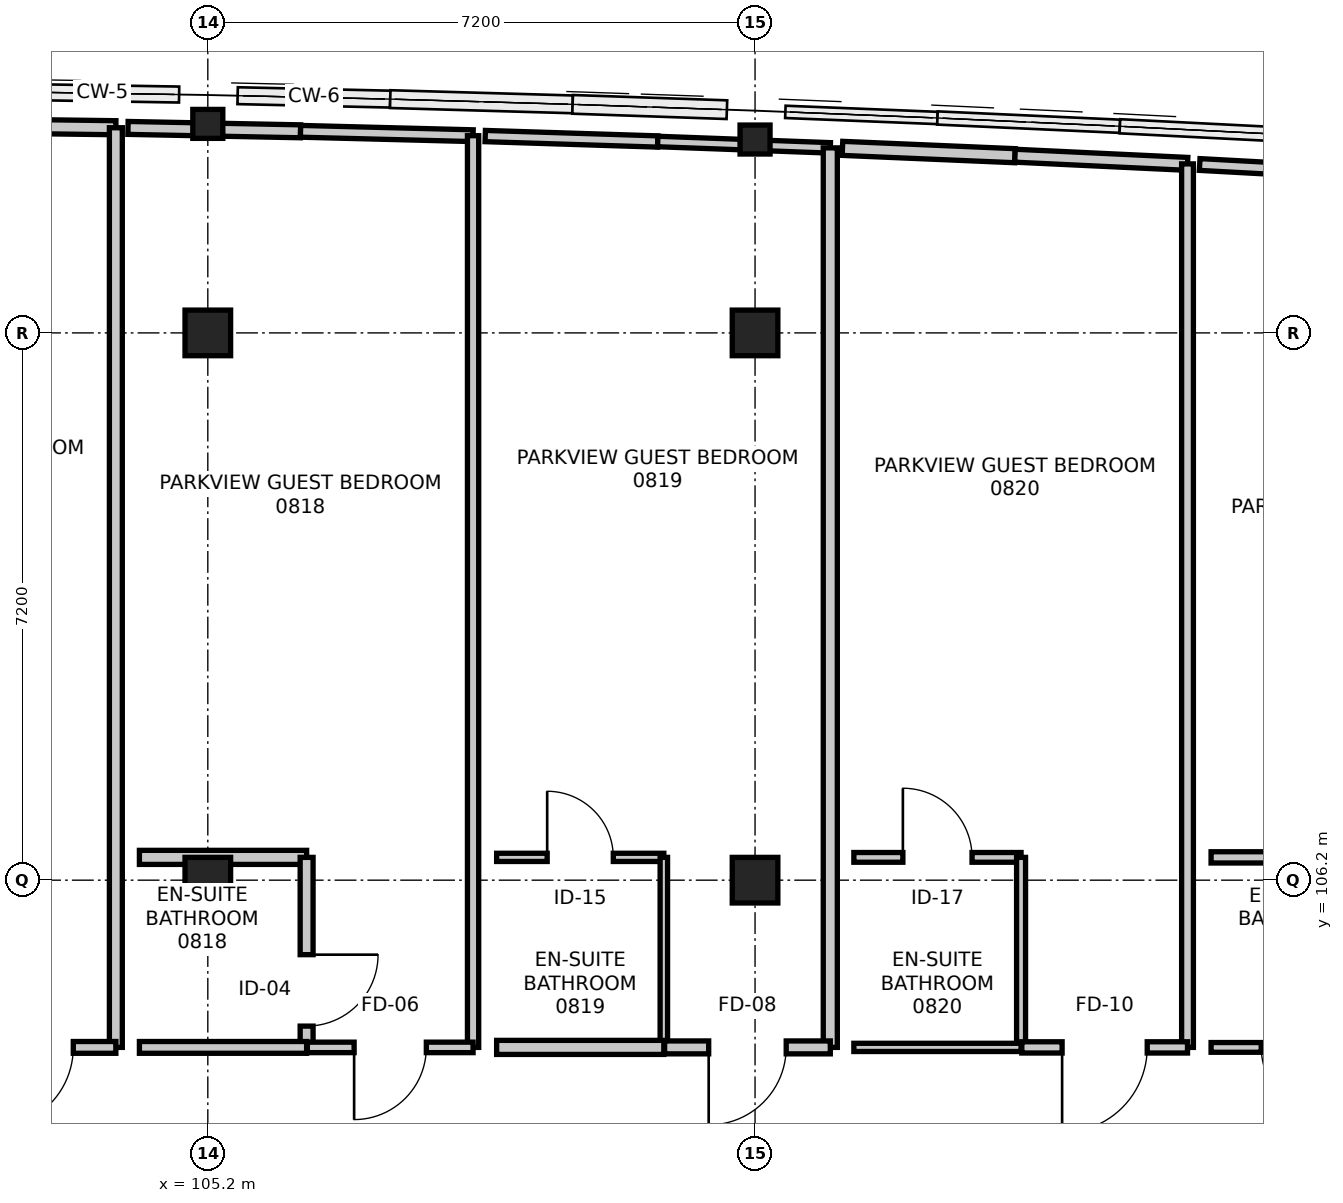
"""IFC4 building model, lengths in metres.
Left out: names, types, materials, properties, quantities, classifications, styles, units other than length and angle.
Written with IfcOpenShell. Run it as: python <this file> out.ifc"""

import sys

from ifc_helpers import new_model, si_unit, direction, frame, frame_2d, origin, origin_2d, place, context, subcontext, project, spatial, rectangle, i_section, extrude, element, fill, save


model = new_model("IFC4")
c1 = context("Model", 3, precision=1e-05, world=origin(), true_north=direction((0.0, 1.0)))
c2 = subcontext(c1, "Body", "Model", "MODEL_VIEW")
j1 = project(units=[si_unit("LENGTHUNIT", "METRE"), si_unit("PLANEANGLEUNIT", "RADIAN")], contexts=[c1])
p1 = place(None, origin())
s1 = spatial("IfcSite", under=j1, at=p1, CompositionType="ELEMENT")
p2 = place(p1, origin())
s2 = spatial("IfcBuilding", under=s1, at=p2, CompositionType="ELEMENT")
p3 = place(p2, frame((0.0, 0.0, 33.6)))
s3 = spatial("IfcBuildingStorey", under=s2, at=p3, CompositionType="ELEMENT", Elevation=33.6)
for number, where, z_axis, x_axis in (
    (1, (105.2, 106.2, 0.0), (0.0, 0.0, 1.0), (1.0, 0.0, 0.0)),
    (2, (105.2, 113.4, 0.0), (0.0, 0.0, 1.0), (1.0, 0.0, 0.0)),
):
    element("IfcColumn", number, at=place(p3, frame(where, z_axis=z_axis, x_axis=x_axis)), inside=s3, PredefinedType="COLUMN", context=c2, shape_type="SweptSolid", body=[
        extrude(rectangle(XDim=0.6, YDim=0.6, at=origin_2d()), origin(), (0.0, 0.0, 1.0), 3.6),
    ])
p4 = place(p3, frame((105.2, 116.15, 0.0), z_axis=(0.0, 0.0, 1.0), x_axis=(1.0, 0.0, 0.0)))
e3 = element("IfcColumn", 3, at=p4, inside=s3, PredefinedType="COLUMN", context=c2, shape_type="SweptSolid", body=[
    extrude(i_section(OverallWidth=0.395, OverallDepth=0.381, WebThickness=0.018, FlangeThickness=0.03, FilletRadius=0.015, at=origin_2d()), origin(), (0.0, 0.0, 1.0), 3.6),
])
for number, where, z_axis, x_axis in (
    (4, (112.4, 106.2, 0.0), (0.0, 0.0, 1.0), (1.0, 0.0, 0.0)),
    (5, (112.4, 113.4, 0.0), (0.0, 0.0, 1.0), (1.0, 0.0, 0.0)),
):
    element("IfcColumn", number, at=place(p3, frame(where, z_axis=z_axis, x_axis=x_axis)), inside=s3, PredefinedType="COLUMN", context=c2, shape_type="SweptSolid", body=[
        extrude(rectangle(XDim=0.6, YDim=0.6, at=origin_2d()), origin(), (0.0, 0.0, 1.0), 3.6),
    ])
p5 = place(p3, frame((112.4, 115.944, 0.0), z_axis=(0.0, 0.0, 1.0), x_axis=(1.0, 0.0, 0.0)))
e6 = element("IfcColumn", 6, at=p5, inside=s3, PredefinedType="COLUMN", context=c2, shape_type="SweptSolid", body=[
    extrude(i_section(OverallWidth=0.395, OverallDepth=0.381, WebThickness=0.018, FlangeThickness=0.03, FilletRadius=0.015, at=origin_2d()), origin(), (0.0, 0.0, 1.0), 3.6),
])
p6 = place(p3, frame((101.72, 116.129, 0.0), z_axis=(0.0, 0.0, 1.0), x_axis=(0.999913929464, -0.013119971972, 0.0)))
e7 = element("IfcWall", 7, at=p6, inside=s3, PredefinedType="PARTITIONING", context=c2, shape_type="SweptSolid", body=[
    extrude(rectangle(XDim=2.27, YDim=0.185, at=frame_2d((1.135, 0.0))), origin(), (0.0, 0.0, 1.0), 2.936),
])
p7 = place(p3, frame((103.99, 116.099, 0.0), z_axis=(0.0, 0.0, 1.0), x_axis=(0.0, -1.0, 0.0)))
e8 = element("IfcWall", 8, at=p7, inside=s3, PredefinedType="PARTITIONING", context=c2, shape_type="SweptSolid", body=[
    extrude(rectangle(XDim=12.099, YDim=0.17, at=frame_2d((6.05, 0.0))), origin(), (0.0, 0.0, 1.0), 2.745),
])
p8 = place(p3, frame((103.99, 104.0, 0.0), z_axis=(0.0, 0.0, 1.0), x_axis=(-1.0, 0.0, 0.0)))
e9 = element("IfcWall", 9, at=p8, inside=s3, PredefinedType="PARTITIONING", context=c2, shape_type="SweptSolid", body=[
    extrude(rectangle(XDim=2.18, YDim=0.155, at=frame_2d((1.09, 0.0))), origin(), (0.0, 0.0, 1.0), 3.36),
])
p9 = place(p8, frame((0.56, 0.0, 0.0)))
e10 = element("IfcOpeningElement", 10, at=p9, cuts=e9, PredefinedType="OPENING", context=c2, shape_type="SweptSolid", body=[
    extrude(rectangle(XDim=1.06, YDim=2.2, at=frame_2d((0.53, 1.1))), frame((0.0, 0.087, 0.0), z_axis=(0.0, -1.0, 0.0), x_axis=(1.0, 0.0, 0.0)), (0.0, 0.0, 1.0), 0.175),
])
p10 = place(p3, frame((104.3, 106.5, 0.0), z_axis=(0.0, 0.0, 1.0), x_axis=(1.0, 0.0, 0.0)))
e11 = element("IfcWall", 11, at=p10, inside=s3, PredefinedType="PARTITIONING", context=c2, shape_type="SweptSolid", body=[
    extrude(rectangle(XDim=2.2, YDim=0.185, at=frame_2d((1.1, 0.0))), origin(), (0.0, 0.0, 1.0), 2.695),
])
p11 = place(p3, frame((106.5, 106.5, 0.0), z_axis=(0.0, 0.0, 1.0), x_axis=(0.0, -1.0, 0.0)))
e12 = element("IfcWall", 12, at=p11, inside=s3, PredefinedType="PARTITIONING", context=c2, shape_type="SweptSolid", body=[
    extrude(rectangle(XDim=2.5, YDim=0.17, at=frame_2d((1.25, 0.0))), origin(), (0.0, 0.0, 1.0), 2.745),
])
p12 = place(p11, frame((1.28, 0.0, 0.0)))
e13 = element("IfcOpeningElement", 13, at=p12, cuts=e12, PredefinedType="OPENING", context=c2, shape_type="SweptSolid", body=[
    extrude(rectangle(XDim=0.94, YDim=2.12, at=frame_2d((0.47, 1.06))), frame((0.0, 0.095, 0.0), z_axis=(0.0, -1.0, 0.0), x_axis=(1.0, 0.0, 0.0)), (0.0, 0.0, 1.0), 0.19),
])
p13 = place(p3, frame((106.5, 104.0, 0.0), z_axis=(0.0, 0.0, 1.0), x_axis=(-1.0, 0.0, 0.0)))
e14 = element("IfcWall", 14, at=p13, inside=s3, PredefinedType="PARTITIONING", context=c2, shape_type="SweptSolid", body=[
    extrude(rectangle(XDim=2.2, YDim=0.155, at=frame_2d((1.1, 0.0))), origin(), (0.0, 0.0, 1.0), 2.695),
])
p14 = place(p3, frame((104.15, 116.097, 0.0), z_axis=(0.0, 0.0, 1.0), x_axis=(0.999808482299, -0.01957035317, 0.0)))
e15 = element("IfcWall", 15, at=p14, inside=s3, PredefinedType="PARTITIONING", context=c2, shape_type="SweptSolid", body=[
    extrude(rectangle(XDim=2.271, YDim=0.17, at=frame_2d((1.135, 0.0))), origin(), (0.0, 0.0, 1.0), 2.936),
])
p15 = place(p3, frame((106.42, 116.052, 0.0), z_axis=(0.0, 0.0, 1.0), x_axis=(0.999675304662, -0.025481076275, 0.0)))
e16 = element("IfcWall", 16, at=p15, inside=s3, PredefinedType="PARTITIONING", context=c2, shape_type="SweptSolid", body=[
    extrude(rectangle(XDim=2.271, YDim=0.155, at=frame_2d((1.135, 0.0))), origin(), (0.0, 0.0, 1.0), 2.936),
])
p16 = place(p3, frame((108.69, 115.994, 0.0), z_axis=(0.0, 0.0, 1.0), x_axis=(0.0, -1.0, 0.0)))
e17 = element("IfcWall", 17, at=p16, inside=s3, PredefinedType="PARTITIONING", context=c2, shape_type="SweptSolid", body=[
    extrude(rectangle(XDim=11.994, YDim=0.148, at=frame_2d((5.997, 0.0))), origin(), (0.0, 0.0, 1.0), 2.745),
])
p17 = place(p3, frame((108.69, 104.0, 0.0), z_axis=(0.0, 0.0, 1.0), x_axis=(-1.0, 0.0, 0.0)))
e18 = element("IfcWall", 18, at=p17, inside=s3, PredefinedType="PARTITIONING", context=c2, shape_type="SweptSolid", body=[
    extrude(rectangle(XDim=2.18, YDim=0.138, at=frame_2d((1.09, 0.0))), origin(), (0.0, 0.0, 1.0), 3.36),
])
p18 = place(p17, frame((0.615, 0.0, 0.0)))
e19 = element("IfcOpeningElement", 19, at=p18, cuts=e18, PredefinedType="OPENING", context=c2, shape_type="SweptSolid", body=[
    extrude(rectangle(XDim=0.95, YDim=2.1, at=frame_2d((0.475, 1.05))), frame((0.0, 0.079, 0.0), z_axis=(0.0, -1.0, 0.0), x_axis=(1.0, 0.0, 0.0)), (0.0, 0.0, 1.0), 0.158),
])
p19 = place(p3, frame((109.0, 106.5, 0.0), z_axis=(0.0, 0.0, 1.0), x_axis=(1.0, 0.0, 0.0)))
e20 = element("IfcWall", 20, at=p19, inside=s3, PredefinedType="PARTITIONING", context=c2, shape_type="SweptSolid", body=[
    extrude(rectangle(XDim=2.2, YDim=0.108, at=frame_2d((1.1, 0.0))), origin(), (0.0, 0.0, 1.0), 3.36),
])
p20 = place(p19, frame((0.665, 0.0, 0.0)))
e21 = element("IfcOpeningElement", 21, at=p20, cuts=e20, PredefinedType="OPENING", context=c2, shape_type="SweptSolid", body=[
    extrude(rectangle(XDim=0.87, YDim=2.07, at=frame_2d((0.435, 1.035))), frame((0.0, 0.064, 0.0), z_axis=(0.0, -1.0, 0.0), x_axis=(1.0, 0.0, 0.0)), (0.0, 0.0, 1.0), 0.128),
])
p21 = place(p3, frame((111.2, 106.5, 0.0), z_axis=(0.0, 0.0, 1.0), x_axis=(0.0, -1.0, 0.0)))
e22 = element("IfcWall", 22, at=p21, inside=s3, PredefinedType="PARTITIONING", context=c2, shape_type="SweptSolid", body=[
    extrude(rectangle(XDim=2.5, YDim=0.098, at=frame_2d((1.25, 0.0))), origin(), (0.0, 0.0, 1.0), 2.745),
])
p22 = place(p3, frame((111.2, 104.0, 0.0), z_axis=(0.0, 0.0, 1.0), x_axis=(-1.0, 0.0, 0.0)))
e23 = element("IfcWall", 23, at=p22, inside=s3, PredefinedType="PARTITIONING", context=c2, shape_type="SweptSolid", body=[
    extrude(rectangle(XDim=2.2, YDim=0.185, at=frame_2d((1.1, 0.0))), origin(), (0.0, 0.0, 1.0), 3.36),
])
p23 = place(p3, frame((108.85, 115.99, 0.0), z_axis=(0.0, 0.0, 1.0), x_axis=(0.999500471728, -0.031603908226, 0.0)))
e24 = element("IfcWall", 24, at=p23, inside=s3, PredefinedType="PARTITIONING", context=c2, shape_type="SweptSolid", body=[
    extrude(rectangle(XDim=2.271, YDim=0.148, at=frame_2d((1.136, 0.0))), origin(), (0.0, 0.0, 1.0), 2.936),
])
p24 = place(p3, frame((111.12, 115.918, 0.0), z_axis=(0.0, 0.0, 1.0), x_axis=(0.999316158321, -0.036975880226, 0.0)))
e25 = element("IfcWall", 25, at=p24, inside=s3, PredefinedType="PARTITIONING", context=c2, shape_type="SweptSolid", body=[
    extrude(rectangle(XDim=2.271, YDim=0.138, at=frame_2d((1.136, 0.0))), origin(), (0.0, 0.0, 1.0), 2.936),
])
p25 = place(p3, frame((113.39, 115.834, 0.0), z_axis=(0.0, 0.0, 1.0), x_axis=(0.0, -1.0, 0.0)))
e26 = element("IfcWall", 26, at=p25, inside=s3, PredefinedType="PARTITIONING", context=c2, shape_type="SweptSolid", body=[
    extrude(rectangle(XDim=11.834, YDim=0.185, at=frame_2d((5.917, 0.0))), origin(), (0.0, 0.0, 1.0), 2.745),
])
p26 = place(p3, frame((113.39, 104.0, 0.0), z_axis=(0.0, 0.0, 1.0), x_axis=(-1.0, 0.0, 0.0)))
e27 = element("IfcWall", 27, at=p26, inside=s3, PredefinedType="PARTITIONING", context=c2, shape_type="SweptSolid", body=[
    extrude(rectangle(XDim=2.18, YDim=0.17, at=frame_2d((1.09, 0.0))), origin(), (0.0, 0.0, 1.0), 2.695),
])
p27 = place(p26, frame((0.58, 0.0, 0.0)))
e28 = element("IfcOpeningElement", 28, at=p27, cuts=e27, PredefinedType="OPENING", context=c2, shape_type="SweptSolid", body=[
    extrude(rectangle(XDim=1.02, YDim=2.15, at=frame_2d((0.51, 1.075))), frame((0.0, 0.095, 0.0), z_axis=(0.0, -1.0, 0.0), x_axis=(1.0, 0.0, 0.0)), (0.0, 0.0, 1.0), 0.19),
])
p28 = place(p3, frame((113.7, 106.5, 0.0), z_axis=(0.0, 0.0, 1.0), x_axis=(1.0, 0.0, 0.0)))
e29 = element("IfcWall", 29, at=p28, inside=s3, PredefinedType="PARTITIONING", context=c2, shape_type="SweptSolid", body=[
    extrude(rectangle(XDim=2.2, YDim=0.128, at=frame_2d((1.1, 0.0))), origin(), (0.0, 0.0, 1.0), 3.36),
])
p29 = place(p28, frame((0.645, 0.0, 0.0)))
e30 = element("IfcOpeningElement", 30, at=p29, cuts=e29, PredefinedType="OPENING", context=c2, shape_type="SweptSolid", body=[
    extrude(rectangle(XDim=0.91, YDim=2.11, at=frame_2d((0.455, 1.055))), frame((0.0, 0.074, 0.0), z_axis=(0.0, -1.0, 0.0), x_axis=(1.0, 0.0, 0.0)), (0.0, 0.0, 1.0), 0.148),
])
p30 = place(p3, frame((115.9, 106.5, 0.0), z_axis=(0.0, 0.0, 1.0), x_axis=(0.0, -1.0, 0.0)))
e31 = element("IfcWall", 31, at=p30, inside=s3, PredefinedType="PARTITIONING", context=c2, shape_type="SweptSolid", body=[
    extrude(rectangle(XDim=2.5, YDim=0.118, at=frame_2d((1.25, 0.0))), origin(), (0.0, 0.0, 1.0), 2.745),
])
p31 = place(p3, frame((115.9, 104.0, 0.0), z_axis=(0.0, 0.0, 1.0), x_axis=(-1.0, 0.0, 0.0)))
e32 = element("IfcWall", 32, at=p31, inside=s3, PredefinedType="PARTITIONING", context=c2, shape_type="SweptSolid", body=[
    extrude(rectangle(XDim=2.2, YDim=0.108, at=frame_2d((1.1, 0.0))), origin(), (0.0, 0.0, 1.0), 3.36),
])
p32 = place(p3, frame((113.55, 115.828, 0.0), z_axis=(0.0, 0.0, 1.0), x_axis=(0.99909428625, -0.042551230088, 0.0)))
e33 = element("IfcWall", 33, at=p32, inside=s3, PredefinedType="PARTITIONING", context=c2, shape_type="SweptSolid", body=[
    extrude(rectangle(XDim=2.272, YDim=0.185, at=frame_2d((1.136, 0.0))), origin(), (0.0, 0.0, 1.0), 2.936),
])
p33 = place(p3, frame((115.82, 115.731, 0.0), z_axis=(0.0, 0.0, 1.0), x_axis=(0.998882190977, -0.047269107768, 0.0)))
e34 = element("IfcWall", 34, at=p33, inside=s3, PredefinedType="PARTITIONING", context=c2, shape_type="SweptSolid", body=[
    extrude(rectangle(XDim=2.272, YDim=0.17, at=frame_2d((1.136, 0.0))), origin(), (0.0, 0.0, 1.0), 2.936),
])
p34 = place(p3, frame((118.09, 115.624, 0.0), z_axis=(0.0, 0.0, 1.0), x_axis=(0.0, -1.0, 0.0)))
e35 = element("IfcWall", 35, at=p34, inside=s3, PredefinedType="PARTITIONING", context=c2, shape_type="SweptSolid", body=[
    extrude(rectangle(XDim=11.624, YDim=0.155, at=frame_2d((5.812, 0.0))), origin(), (0.0, 0.0, 1.0), 2.745),
])
p35 = place(p3, frame((118.09, 104.0, 0.0), z_axis=(0.0, 0.0, 1.0), x_axis=(-1.0, 0.0, 0.0)))
e36 = element("IfcWall", 36, at=p35, inside=s3, PredefinedType="PARTITIONING", context=c2, shape_type="SweptSolid", body=[
    extrude(rectangle(XDim=2.18, YDim=0.148, at=frame_2d((1.09, 0.0))), origin(), (0.0, 0.0, 1.0), 3.36),
])
p36 = place(p35, frame((0.53, 0.0, 0.0)))
e37 = element("IfcOpeningElement", 37, at=p36, cuts=e36, PredefinedType="OPENING", context=c2, shape_type="SweptSolid", body=[
    extrude(rectangle(XDim=1.12, YDim=2.2, at=frame_2d((0.56, 1.1))), frame((0.0, 0.084, 0.0), z_axis=(0.0, -1.0, 0.0), x_axis=(1.0, 0.0, 0.0)), (0.0, 0.0, 1.0), 0.168),
])
p37 = place(p3, frame((118.4, 106.5, 0.0), z_axis=(0.0, 0.0, 1.0), x_axis=(1.0, 0.0, 0.0)))
e38 = element("IfcWall", 38, at=p37, inside=s3, PredefinedType="PARTITIONING", context=c2, shape_type="SweptSolid", body=[
    extrude(rectangle(XDim=2.2, YDim=0.148, at=frame_2d((1.1, 0.0))), origin(), (0.0, 0.0, 1.0), 2.695),
])
p38 = place(p3, frame((120.6, 104.0, 0.0), z_axis=(0.0, 0.0, 1.0), x_axis=(-1.0, 0.0, 0.0)))
e39 = element("IfcWall", 39, at=p38, inside=s3, PredefinedType="PARTITIONING", context=c2, shape_type="SweptSolid", body=[
    extrude(rectangle(XDim=2.2, YDim=0.128, at=frame_2d((1.1, 0.0))), origin(), (0.0, 0.0, 1.0), 2.695),
])
p39 = place(p38, frame((0.66, 0.0, 0.0)))
e40 = element("IfcOpeningElement", 40, at=p39, cuts=e39, PredefinedType="OPENING", context=c2, shape_type="SweptSolid", body=[
    extrude(rectangle(XDim=0.88, YDim=2.06, at=frame_2d((0.44, 1.03))), frame((0.0, 0.074, 0.0), z_axis=(0.0, -1.0, 0.0), x_axis=(1.0, 0.0, 0.0)), (0.0, 0.0, 1.0), 0.148),
])
p40 = place(p3, frame((118.25, 115.615, 0.0), z_axis=(0.0, 0.0, 1.0), x_axis=(0.998531223826, -0.054179286128, 0.0)))
e41 = element("IfcWall", 41, at=p40, inside=s3, PredefinedType="PARTITIONING", context=c2, shape_type="SweptSolid", body=[
    extrude(rectangle(XDim=4.547, YDim=0.155, at=frame_2d((2.273, 0.0))), origin(), (0.0, 0.0, 1.0), 2.936),
])
p41 = place(p9, origin())
e42 = element("IfcDoor", 42, at=p41, inside=s3, OperationType="SINGLE_SWING_RIGHT", PredefinedType="DOOR", context=c2, shape_type="SweptSolid", body=[
    extrude(rectangle(XDim=1.06, YDim=2.2, at=frame_2d((0.53, 1.1))), frame((0.0, 0.025, 0.0), z_axis=(0.0, -1.0, 0.0), x_axis=(1.0, 0.0, 0.0)), (0.0, 0.0, 1.0), 0.05),
])
fill(e10, e42)
p42 = place(p12, origin())
e43 = element("IfcDoor", 43, at=p42, inside=s3, OperationType="SINGLE_SWING_LEFT", PredefinedType="DOOR", context=c2, shape_type="SweptSolid", body=[
    extrude(rectangle(XDim=0.94, YDim=2.12, at=frame_2d((0.47, 1.06))), frame((0.0, 0.025, 0.0), z_axis=(0.0, -1.0, 0.0), x_axis=(1.0, 0.0, 0.0)), (0.0, 0.0, 1.0), 0.05),
])
fill(e13, e43)
p43 = place(p18, origin())
e44 = element("IfcDoor", 44, at=p43, inside=s3, OperationType="SINGLE_SWING_RIGHT", PredefinedType="DOOR", context=c2, shape_type="SweptSolid", body=[
    extrude(rectangle(XDim=0.95, YDim=2.1, at=frame_2d((0.475, 1.05))), frame((0.0, 0.025, 0.0), z_axis=(0.0, -1.0, 0.0), x_axis=(1.0, 0.0, 0.0)), (0.0, 0.0, 1.0), 0.05),
])
fill(e19, e44)
p44 = place(p20, origin())
e45 = element("IfcDoor", 45, at=p44, inside=s3, OperationType="SINGLE_SWING_LEFT", PredefinedType="DOOR", context=c2, shape_type="SweptSolid", body=[
    extrude(rectangle(XDim=0.87, YDim=2.07, at=frame_2d((0.435, 1.035))), frame((0.0, 0.025, 0.0), z_axis=(0.0, -1.0, 0.0), x_axis=(1.0, 0.0, 0.0)), (0.0, 0.0, 1.0), 0.05),
])
fill(e21, e45)
p45 = place(p27, origin())
e46 = element("IfcDoor", 46, at=p45, inside=s3, OperationType="SINGLE_SWING_RIGHT", PredefinedType="DOOR", context=c2, shape_type="SweptSolid", body=[
    extrude(rectangle(XDim=1.02, YDim=2.15, at=frame_2d((0.51, 1.075))), frame((0.0, 0.025, 0.0), z_axis=(0.0, -1.0, 0.0), x_axis=(1.0, 0.0, 0.0)), (0.0, 0.0, 1.0), 0.05),
])
fill(e28, e46)
p46 = place(p29, origin())
e47 = element("IfcDoor", 47, at=p46, inside=s3, OperationType="SINGLE_SWING_LEFT", PredefinedType="DOOR", context=c2, shape_type="SweptSolid", body=[
    extrude(rectangle(XDim=0.91, YDim=2.11, at=frame_2d((0.455, 1.055))), frame((0.0, 0.025, 0.0), z_axis=(0.0, -1.0, 0.0), x_axis=(1.0, 0.0, 0.0)), (0.0, 0.0, 1.0), 0.05),
])
fill(e30, e47)
p47 = place(p36, origin())
e48 = element("IfcDoor", 48, at=p47, inside=s3, OperationType="SINGLE_SWING_RIGHT", PredefinedType="DOOR", context=c2, shape_type="SweptSolid", body=[
    extrude(rectangle(XDim=1.12, YDim=2.2, at=frame_2d((0.56, 1.1))), frame((0.0, 0.025, 0.0), z_axis=(0.0, -1.0, 0.0), x_axis=(1.0, 0.0, 0.0)), (0.0, 0.0, 1.0), 0.05),
])
fill(e37, e48)
p48 = place(p39, origin())
e49 = element("IfcDoor", 49, at=p48, inside=s3, OperationType="SINGLE_SWING_LEFT", PredefinedType="DOOR", context=c2, shape_type="SweptSolid", body=[
    extrude(rectangle(XDim=0.88, YDim=2.06, at=frame_2d((0.44, 1.03))), frame((0.0, 0.025, 0.0), z_axis=(0.0, -1.0, 0.0), x_axis=(1.0, 0.0, 0.0)), (0.0, 0.0, 1.0), 0.05),
])
fill(e40, e49)
save(model, sys.argv[1])
